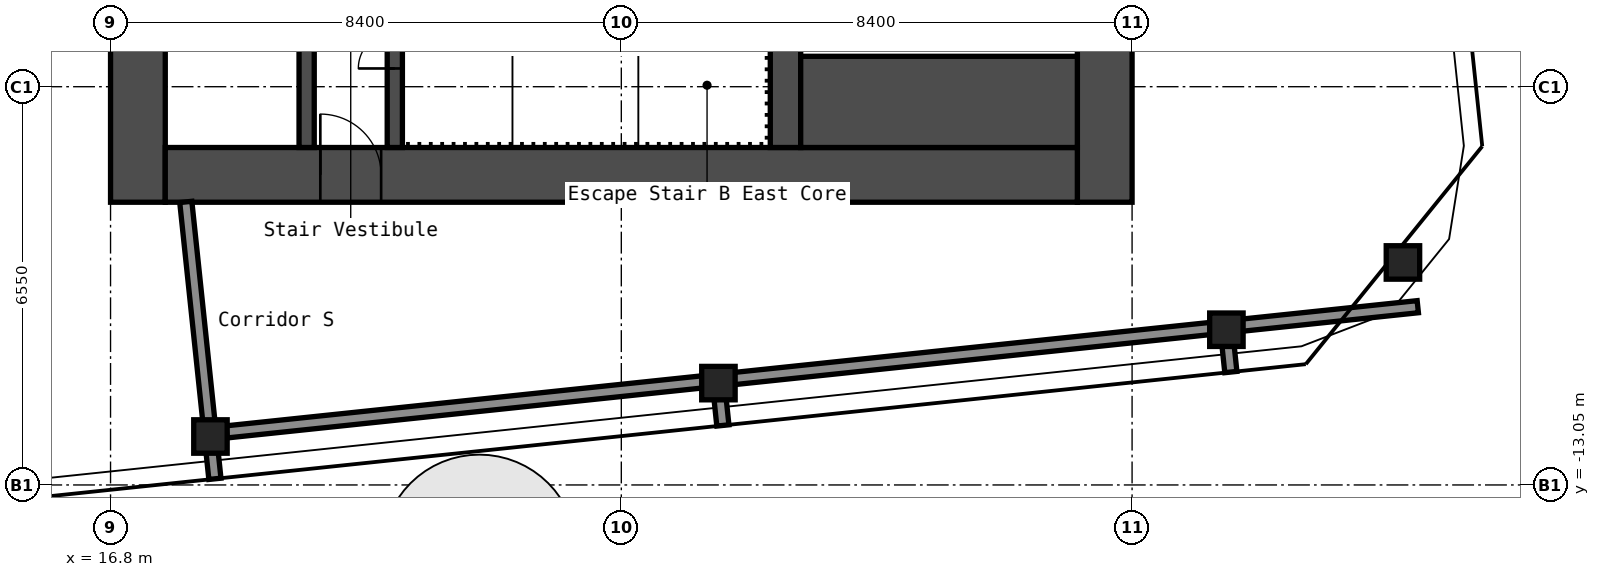
"""IFC4 building model, lengths in metres.
Left out: names, types, materials, properties, quantities, classifications, styles, units other than length and angle.
Written with IfcOpenShell. Run it as: python <this file> out.ifc"""

import sys

from ifc_helpers import new_model, si_unit, direction, frame, frame_2d, origin, origin_2d, place, context, subcontext, project, spatial, rectangle, hollow_rectangle, extrude, element, fill, save


model = new_model("IFC4")
c1 = context("Model", 3, precision=1e-05, world=origin(), true_north=direction((0.0, 1.0)))
c2 = subcontext(c1, "Body", "Model", "MODEL_VIEW")
j1 = project(units=[si_unit("LENGTHUNIT", "METRE"), si_unit("PLANEANGLEUNIT", "RADIAN")], contexts=[c1])
p1 = place(None, origin())
s1 = spatial("IfcSite", under=j1, at=p1, CompositionType="ELEMENT")
p2 = place(p1, origin())
s2 = spatial("IfcBuilding", under=s1, at=p2, CompositionType="ELEMENT")
p3 = place(p2, frame((0.0, 0.0, 261.4)))
s3 = spatial("IfcBuildingStorey", under=s2, at=p3, CompositionType="ELEMENT", Elevation=261.4)
for number, where, z_axis, x_axis in (
    (1, (18.443, -12.253, 0.0), (0.0, 0.0, 1.0), (1.0, 0.0, 0.0)),
    (2, (26.797, -11.375, 0.0), (0.0, 0.0, 1.0), (1.0, 0.0, 0.0)),
    (3, (35.151, -10.497, 0.0), (0.0, 0.0, 1.0), (1.0, 0.0, 0.0)),
    (4, (38.054, -9.39, 0.0), (0.0, 0.0, 1.0), (1.0, 0.0, 0.0)),
):
    element("IfcColumn", number, at=place(p3, frame(where, z_axis=z_axis, x_axis=x_axis)), inside=s3, PredefinedType="COLUMN", context=c2, shape_type="SweptSolid", body=[
        extrude(hollow_rectangle(XDim=0.55, YDim=0.55, WallThickness=0.022, InnerFilletRadius=0.033, OuterFilletRadius=0.055, at=origin_2d()), origin(), (0.0, 0.0, 1.0), 2.75),
    ])
p4 = place(p3, frame((17.25, -8.4, 0.0), z_axis=(0.0, 0.0, 1.0), x_axis=(0.0, 1.0, 0.0)))
e5 = element("IfcWall", 5, at=p4, inside=s3, PredefinedType="SHEAR", context=c2, shape_type="SweptSolid", body=[
    extrude(rectangle(XDim=16.8, YDim=0.9, at=frame_2d((8.4, 0.0))), origin(), (0.0, 0.0, 1.0), 2.75),
])
p5 = place(p4, frame((11.879, 0.0, 0.0)))
e6 = element("IfcOpeningElement", 6, at=p5, cuts=e5, PredefinedType="OPENING", context=c2, shape_type="SweptSolid", body=[
    extrude(rectangle(XDim=1.6, YDim=2.1, at=frame_2d((0.8, 1.05))), frame((0.0, 0.46, 0.0), z_axis=(0.0, -1.0, 0.0), x_axis=(1.0, 0.0, 0.0)), (0.0, 0.0, 1.0), 0.92),
])
p6 = place(p3, frame((33.15, -8.4, 0.0), z_axis=(0.0, 0.0, 1.0), x_axis=(0.0, 1.0, 0.0)))
e7 = element("IfcWall", 7, at=p6, inside=s3, PredefinedType="SHEAR", context=c2, shape_type="SweptSolid", body=[
    extrude(rectangle(XDim=16.8, YDim=0.9, at=frame_2d((8.4, 0.0))), origin(), (0.0, 0.0, 1.0), 2.75),
])
p7 = place(p3, frame((17.7, -7.95, 0.0), z_axis=(0.0, 0.0, 1.0), x_axis=(1.0, 0.0, 0.0)))
e8 = element("IfcWall", 8, at=p7, inside=s3, PredefinedType="SHEAR", context=c2, shape_type="SweptSolid", body=[
    extrude(rectangle(XDim=15.0, YDim=0.9, at=frame_2d((7.5, 0.0))), origin(), (0.0, 0.0, 1.0), 2.75),
])
p8 = place(p7, frame((2.55, 0.0, 0.0)))
e9 = element("IfcOpeningElement", 9, at=p8, cuts=e8, PredefinedType="OPENING", context=c2, shape_type="SweptSolid", body=[
    extrude(rectangle(XDim=1.0, YDim=2.1, at=frame_2d((0.5, 1.05))), frame((0.0, 0.46, 0.0), z_axis=(0.0, -1.0, 0.0), x_axis=(1.0, 0.0, 0.0)), (0.0, 0.0, 1.0), 0.92),
])
p9 = place(p3, frame((20.025, -7.5, 0.0), z_axis=(0.0, 0.0, 1.0), x_axis=(0.0, 1.0, 0.0)))
e10 = element("IfcWall", 10, at=p9, inside=s3, PredefinedType="SHEAR", context=c2, shape_type="SweptSolid", body=[
    extrude(rectangle(XDim=6.3, YDim=0.25, at=frame_2d((3.15, 0.0))), origin(), (0.0, 0.0, 1.0), 2.75),
])
p10 = place(p9, frame((2.4, 0.0, 0.0)))
e11 = element("IfcOpeningElement", 11, at=p10, cuts=e10, PredefinedType="OPENING", context=c2, shape_type="SweptSolid", body=[
    extrude(rectangle(XDim=1.0, YDim=2.1, at=frame_2d((0.5, 1.05))), frame((0.0, 0.135, 0.0), z_axis=(0.0, -1.0, 0.0), x_axis=(1.0, 0.0, 0.0)), (0.0, 0.0, 1.0), 0.27),
])
p11 = place(p3, frame((21.475, -7.5, 0.0), z_axis=(0.0, 0.0, 1.0), x_axis=(0.0, 1.0, 0.0)))
e12 = element("IfcWall", 12, at=p11, inside=s3, PredefinedType="SHEAR", context=c2, shape_type="SweptSolid", body=[
    extrude(rectangle(XDim=3.75, YDim=0.25, at=frame_2d((1.875, 0.0))), origin(), (0.0, 0.0, 1.0), 2.75),
])
p12 = place(p11, frame((1.3, 0.0, 0.0)))
e13 = element("IfcOpeningElement", 13, at=p12, cuts=e12, PredefinedType="OPENING", context=c2, shape_type="SweptSolid", body=[
    extrude(rectangle(XDim=1.2, YDim=2.1, at=frame_2d((0.6, 1.05))), frame((0.0, 0.135, 0.0), z_axis=(0.0, -1.0, 0.0), x_axis=(1.0, 0.0, 0.0)), (0.0, 0.0, 1.0), 0.27),
])
p13 = place(p3, frame((27.9, -7.5, 0.0), z_axis=(0.0, 0.0, 1.0), x_axis=(0.0, 1.0, 0.0)))
e14 = element("IfcWall", 14, at=p13, inside=s3, PredefinedType="SHEAR", context=c2, shape_type="SweptSolid", body=[
    extrude(rectangle(XDim=3.75, YDim=0.5, at=frame_2d((1.875, 0.0))), origin(), (0.0, 0.0, 1.0), 2.75),
])
p14 = place(p3, frame((28.15, -6.75, 0.0), z_axis=(0.0, 0.0, 1.0), x_axis=(1.0, 0.0, 0.0)))
e15 = element("IfcWall", 15, at=p14, inside=s3, PredefinedType="SHEAR", context=c2, shape_type="SweptSolid", body=[
    extrude(rectangle(XDim=4.55, YDim=1.5, at=frame_2d((2.275, 0.0))), origin(), (0.0, 0.0, 1.0), 2.75),
])
p15 = place(p3, frame((18.708, -12.177, 0.0), z_axis=(0.0, 0.0, 1.0), x_axis=(0.994521604238, 0.104531233147, 0.0)))
e16 = element("IfcWall", 16, at=p15, inside=s3, PredefinedType="PARTITIONING", context=c2, shape_type="SweptSolid", body=[
    extrude(rectangle(XDim=19.698, YDim=0.2, at=frame_2d((9.849, 0.0))), origin(), (0.0, 0.0, 1.0), 2.75),
])
p16 = place(p3, frame((18.516, -12.949, 0.0), z_axis=(0.0, 0.0, 1.0), x_axis=(-0.104548796268, 0.994519758074, 0.0)))
e17 = element("IfcWall", 17, at=p16, inside=s3, PredefinedType="PARTITIONING", context=c2, shape_type="SweptSolid", body=[
    extrude(rectangle(XDim=4.579, YDim=0.2, at=frame_2d((2.29, 0.0))), origin(), (0.0, 0.0, 1.0), 2.75),
])
for number, where, z_axis, x_axis in (
    (18, (26.87, -12.071, 0.0), (0.0, 0.0, 1.0), (-0.105, 0.994, 0.0)),
    (19, (35.224, -11.193, 0.0), (0.0, 0.0, 1.0), (-0.105, 0.994, 0.0)),
):
    element("IfcWall", number, at=place(p3, frame(where, z_axis=z_axis, x_axis=x_axis)), inside=s3, PredefinedType="PARTITIONING", context=c2, shape_type="SweptSolid", body=[
        extrude(rectangle(XDim=0.434, YDim=0.2, at=frame_2d((0.217, 0.0))), origin(), (0.0, 0.0, 1.0), 2.75),
    ])
p17 = place(p8, origin())
e20 = element("IfcDoor", 20, at=p17, inside=s3, OperationType="SINGLE_SWING_RIGHT", PredefinedType="DOOR", context=c2, shape_type="SweptSolid", body=[
    extrude(rectangle(XDim=1.0, YDim=2.1, at=frame_2d((0.5, 1.05))), frame((0.0, 0.025, 0.0), z_axis=(0.0, -1.0, 0.0), x_axis=(1.0, 0.0, 0.0)), (0.0, 0.0, 1.0), 0.05),
])
fill(e9, e20)
p18 = place(p12, origin())
e21 = element("IfcDoor", 21, at=p18, inside=s3, OperationType="DOUBLE_DOOR_SINGLE_SWING", PredefinedType="DOOR", context=c2, shape_type="SweptSolid", body=[
    extrude(rectangle(XDim=1.2, YDim=2.1, at=frame_2d((0.6, 1.05))), frame((0.0, 0.025, 0.0), z_axis=(0.0, -1.0, 0.0), x_axis=(1.0, 0.0, 0.0)), (0.0, 0.0, 1.0), 0.05),
])
fill(e13, e21)
save(model, sys.argv[1])
